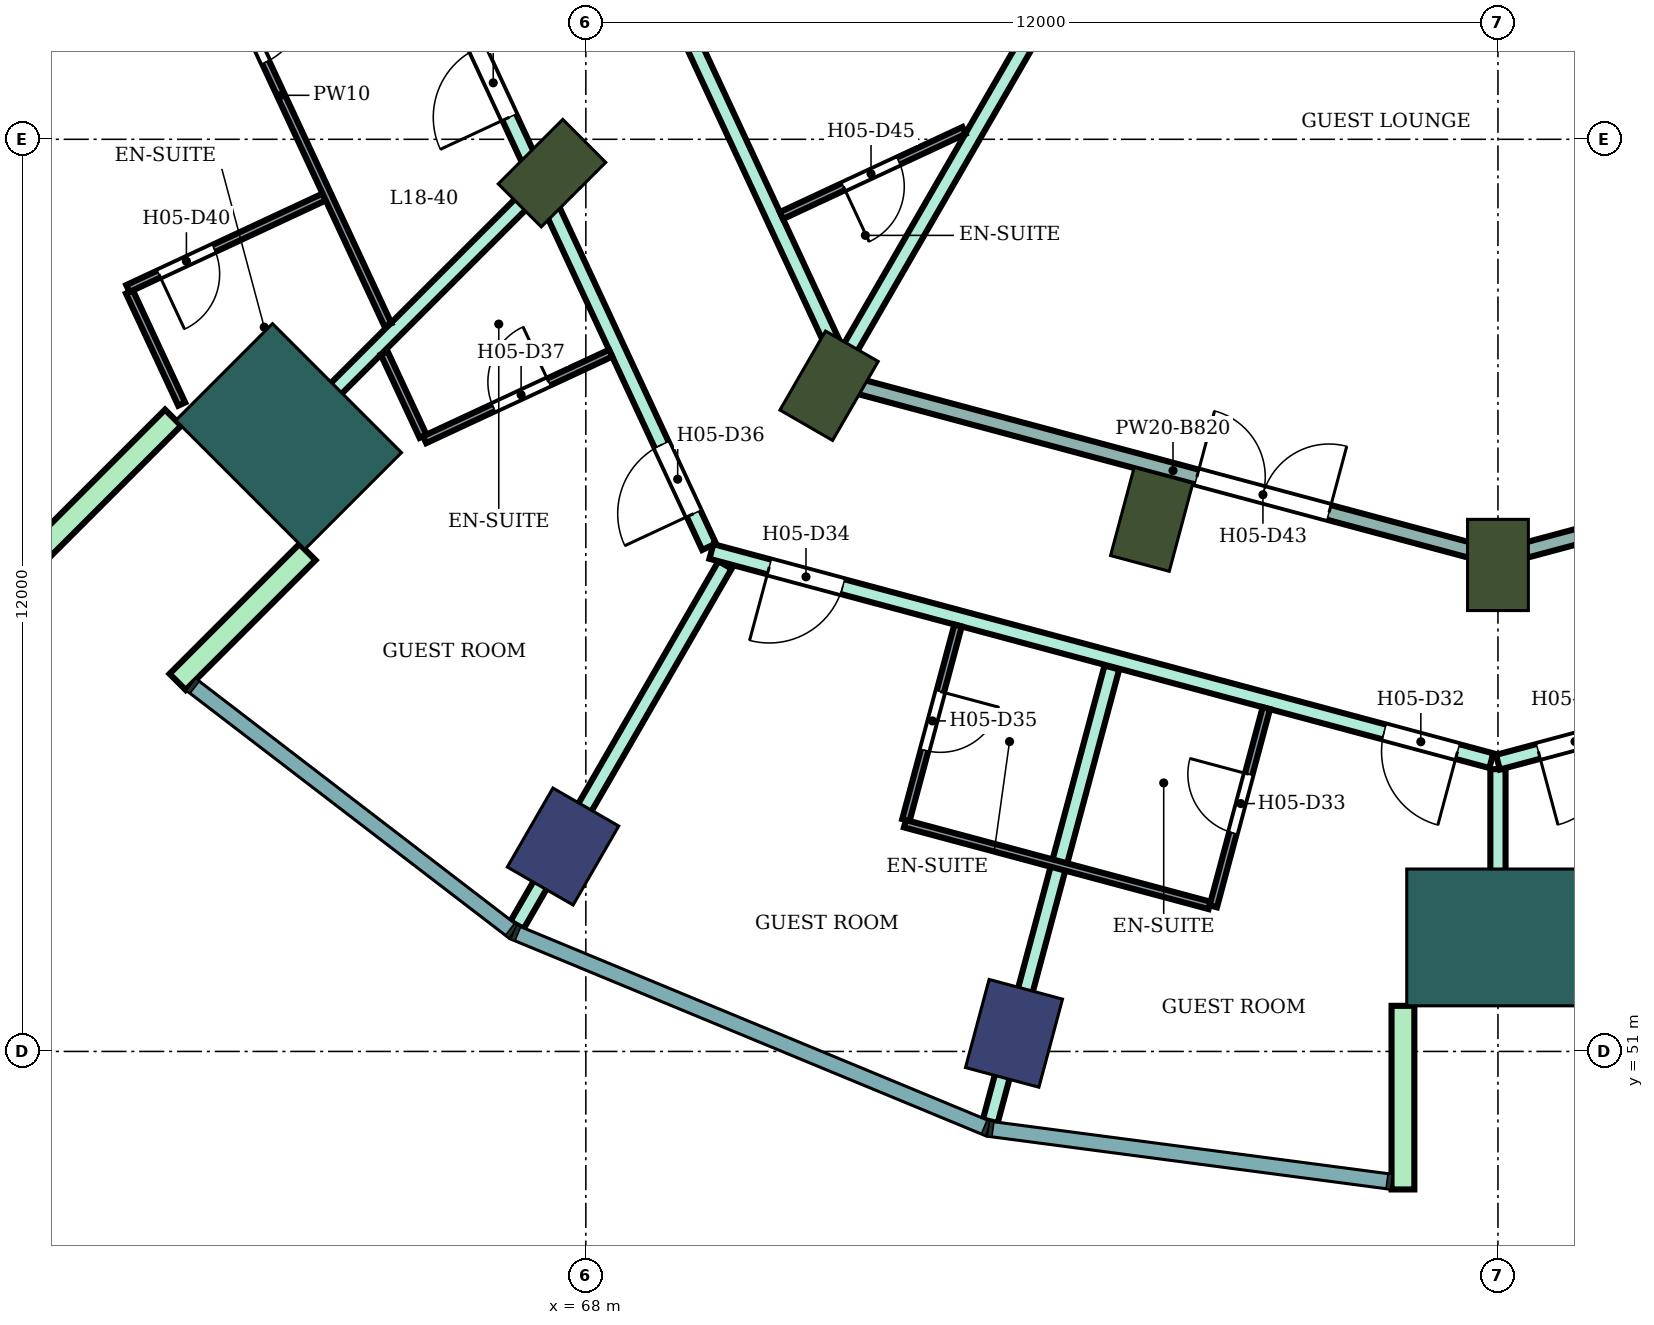
"""IFC4 building model, lengths in metres.
Left out: names, types, materials, properties, quantities, classifications, styles, units other than length and angle.
Written with IfcOpenShell. Run it as: python <this file> out.ifc"""

import sys

from ifc_helpers import new_model, si_unit, direction, frame, frame_2d, origin, origin_2d, place, context, subcontext, project, spatial, rectangle, extrude, element, fill, save


model = new_model("IFC4")
c1 = context("Model", 3, precision=1e-05, world=origin(), true_north=direction((0.0, 1.0)))
c2 = subcontext(c1, "Body", "Model", "MODEL_VIEW")
j1 = project(units=[si_unit("LENGTHUNIT", "METRE"), si_unit("PLANEANGLEUNIT", "RADIAN")], contexts=[c1])
p1 = place(None, origin())
s1 = spatial("IfcSite", under=j1, at=p1, CompositionType="ELEMENT")
p2 = place(p1, origin())
s2 = spatial("IfcBuilding", under=s1, at=p2, CompositionType="ELEMENT")
p3 = place(p2, frame((0.0, 0.0, 82.4)))
s3 = spatial("IfcBuildingStorey", under=s2, at=p3, CompositionType="ELEMENT", Elevation=82.4)
for number, where, z_axis, x_axis in (
    (1, (67.7, 53.696, 0.0), (0.0, 0.0, 1.0), (-0.5, -0.866, 0.0)),
    (2, (73.633, 51.238, 0.0), (0.0, 0.0, 1.0), (-0.259, -0.966, 0.0)),
):
    element("IfcColumn", number, at=place(p3, frame(where, z_axis=z_axis, x_axis=x_axis)), inside=s3, PredefinedType="COLUMN", context=c2, shape_type="SweptSolid", body=[
        extrude(rectangle(XDim=1.2, YDim=1.0, at=origin_2d()), origin(), (0.0, 0.0, 1.0), 3.8),
    ])
for number, where, z_axis, x_axis in (
    (3, (67.555, 62.555, 0.0), (0.0, 0.0, 1.0), (-0.707, -0.707, 0.0)),
    (4, (71.2, 59.758, 0.0), (0.0, 0.0, 1.0), (-0.5, -0.866, 0.0)),
    (5, (75.445, 58.0, 0.0), (0.0, 0.0, 1.0), (-0.259, -0.966, 0.0)),
    (6, (80.0, 57.4, 0.0), (0.0, 0.0, 1.0), (0.0, -1.0, 0.0)),
):
    element("IfcColumn", number, at=place(p3, frame(where, z_axis=z_axis, x_axis=x_axis)), inside=s3, PredefinedType="COLUMN", context=c2, shape_type="SweptSolid", body=[
        extrude(rectangle(XDim=1.2, YDim=0.8, at=origin_2d()), origin(), (0.0, 0.0, 1.0), 3.8),
    ])
for number, where, z_axis, x_axis in (
    (7, (64.09, 59.09, 0.0), (0.0, 0.0, 1.0), (-0.707, -0.707, 0.0)),
    (8, (80.0, 52.5, 0.0), (0.0, 0.0, 1.0), (0.0, -1.0, 0.0)),
):
    element("IfcColumn", number, at=place(p3, frame(where, z_axis=z_axis, x_axis=x_axis)), inside=s3, PredefinedType="COLUMN", context=c2, shape_type="SweptSolid", body=[
        extrude(rectangle(XDim=1.8, YDim=2.4, at=origin_2d()), origin(), (0.0, 0.0, 1.0), 3.8),
    ])
for number, where, z_axis, x_axis in (
    (9, (62.57, 59.338, 0.0), (0.0, 0.0, 1.0), (-0.707, -0.707, 0.0)),
    (10, (64.338, 57.57, 0.0), (0.0, 0.0, 1.0), (-0.707, -0.707, 0.0)),
    (11, (78.75, 51.6, 0.0), (0.0, 0.0, 1.0), (0.0, -1.0, 0.0)),
):
    element("IfcWall", number, at=place(p3, frame(where, z_axis=z_axis, x_axis=x_axis)), inside=s3, PredefinedType="NOTDEFINED", context=c2, shape_type="SweptSolid", body=[
        extrude(rectangle(XDim=2.416, YDim=0.3, at=frame_2d((1.208, 0.0))), origin(), (0.0, 0.0, 1.0), 3.8),
    ])
p4 = place(p3, frame((63.593, 58.599, 0.0), z_axis=(0.0, 0.0, 1.0), x_axis=(0.707292874152, 0.706920639233, 0.0)))
e12 = element("IfcWall", 12, at=p4, inside=s3, PredefinedType="PARTITIONING", context=c2, shape_type="SweptSolid", body=[
    extrude(rectangle(XDim=5.247, YDim=0.2, at=frame_2d((2.624, 0.0))), origin(), (0.0, 0.0, 1.0), 3.35),
])
p5 = place(p3, frame((66.15, 65.1, 0.0), z_axis=(0.0, 0.0, 1.0), x_axis=(0.421874842351, -0.906654078131, 0.0)))
e13 = element("IfcWall", 13, at=p5, inside=s3, PredefinedType="PARTITIONING", context=c2, shape_type="SweptSolid", body=[
    extrude(rectangle(XDim=8.228, YDim=0.2, at=frame_2d((4.114, 0.0))), origin(), (0.0, 0.0, 1.0), 3.35),
])
p6 = place(p5, frame((6.748, 0.0, 0.0)))
e14 = element("IfcOpeningElement", 14, at=p6, cuts=e13, PredefinedType="OPENING", context=c2, shape_type="SweptSolid", body=[
    extrude(rectangle(XDim=1.0, YDim=2.1, at=frame_2d((0.5, 1.05))), frame((0.0, 0.11, 0.0), z_axis=(0.0, -1.0, 0.0), x_axis=(1.0, 0.0, 0.0)), (0.0, 0.0, 1.0), 0.22),
])
p7 = place(p5, frame((0.997, 0.0, 0.0)))
e15 = element("IfcOpeningElement", 15, at=p7, cuts=e13, PredefinedType="OPENING", context=c2, shape_type="SweptSolid", body=[
    extrude(rectangle(XDim=1.0, YDim=2.1, at=frame_2d((0.5, 1.05))), frame((0.0, 0.11, 0.0), z_axis=(0.0, -1.0, 0.0), x_axis=(1.0, 0.0, 0.0)), (0.0, 0.0, 1.0), 0.22),
])
p8 = place(p3, frame((67.094, 52.663, 0.0), z_axis=(0.0, 0.0, 1.0), x_axis=(0.50023225055, 0.865891272337, 0.0)))
e16 = element("IfcWall", 16, at=p8, inside=s3, PredefinedType="PARTITIONING", context=c2, shape_type="SweptSolid", body=[
    extrude(rectangle(XDim=5.472, YDim=0.2, at=frame_2d((2.736, 0.0))), origin(), (0.0, 0.0, 1.0), 3.35),
])
p9 = place(p3, frame((68.321, 66.6, 0.0), z_axis=(0.0, 0.0, 1.0), x_axis=(0.421914092414, -0.906635813666, 0.0)))
e17 = element("IfcWall", 17, at=p9, inside=s3, PredefinedType="PARTITIONING", context=c2, shape_type="SweptSolid", body=[
    extrude(rectangle(XDim=7.459, YDim=0.2, at=frame_2d((3.73, 0.0))), origin(), (0.0, 0.0, 1.0), 3.35),
])
p10 = place(p9, frame((0.7, 0.0, 0.0)))
e18 = element("IfcOpeningElement", 18, at=p10, cuts=e17, PredefinedType="OPENING", context=c2, shape_type="SweptSolid", body=[
    extrude(rectangle(XDim=1.0, YDim=2.1, at=frame_2d((0.5, 1.05))), frame((0.0, 0.11, 0.0), z_axis=(0.0, -1.0, 0.0), x_axis=(1.0, 0.0, 0.0)), (0.0, 0.0, 1.0), 0.22),
])
p11 = place(p3, frame((69.652, 57.578, 0.0), z_axis=(0.0, 0.0, 1.0), x_axis=(0.965857425723, -0.259074184695, 0.0)))
e19 = element("IfcWall", 19, at=p11, inside=s3, PredefinedType="PARTITIONING", context=c2, shape_type="SweptSolid", body=[
    extrude(rectangle(XDim=10.623, YDim=0.2, at=frame_2d((5.312, 0.0))), origin(), (0.0, 0.0, 1.0), 3.35),
])
p12 = place(p11, frame((9.163, 0.0, 0.0)))
e20 = element("IfcOpeningElement", 20, at=p12, cuts=e19, PredefinedType="OPENING", context=c2, shape_type="SweptSolid", body=[
    extrude(rectangle(XDim=1.0, YDim=2.1, at=frame_2d((0.5, 1.05))), frame((0.0, 0.11, 0.0), z_axis=(0.0, -1.0, 0.0), x_axis=(1.0, 0.0, 0.0)), (0.0, 0.0, 1.0), 0.22),
])
p13 = place(p11, frame((0.788, 0.0, 0.0)))
e21 = element("IfcOpeningElement", 21, at=p13, cuts=e19, PredefinedType="OPENING", context=c2, shape_type="SweptSolid", body=[
    extrude(rectangle(XDim=1.0, YDim=2.1, at=frame_2d((0.5, 1.05))), frame((0.0, 0.11, 0.0), z_axis=(0.0, -1.0, 0.0), x_axis=(1.0, 0.0, 0.0)), (0.0, 0.0, 1.0), 0.22),
])
p14 = place(p3, frame((71.459, 60.218, 0.0), z_axis=(0.0, 0.0, 1.0), x_axis=(0.500232027118, 0.865891401416, 0.0)))
e22 = element("IfcWall", 22, at=p14, inside=s3, PredefinedType="PARTITIONING", context=c2, shape_type="SweptSolid", body=[
    extrude(rectangle(XDim=9.372, YDim=0.2, at=frame_2d((4.686, 0.0))), origin(), (0.0, 0.0, 1.0), 3.35),
])
p15 = place(p3, frame((71.498, 59.774, 0.0), z_axis=(0.0, 0.0, 1.0), x_axis=(0.965911938046, -0.258870871168, 0.0)))
e23 = element("IfcWall", 23, at=p15, inside=s3, PredefinedType="PARTITIONING", context=c2, shape_type="SweptSolid", body=[
    extrude(rectangle(XDim=8.752, YDim=0.2, at=frame_2d((4.376, 0.0))), origin(), (0.0, 0.0, 1.0), 2.98),
])
p16 = place(p15, frame((4.701, 0.0, 0.0)))
e24 = element("IfcOpeningElement", 24, at=p16, cuts=e23, PredefinedType="OPENING", context=c2, shape_type="SweptSolid", body=[
    extrude(rectangle(XDim=1.8, YDim=2.1, at=frame_2d((0.9, 1.05))), frame((0.0, 0.11, 0.0), z_axis=(0.0, -1.0, 0.0), x_axis=(1.0, 0.0, 0.0)), (0.0, 0.0, 1.0), 0.22),
])
p17 = place(p3, frame((73.321, 50.081, 0.0), z_axis=(0.0, 0.0, 1.0), x_axis=(0.258886797764, 0.965907669471, 0.0)))
e25 = element("IfcWall", 25, at=p17, inside=s3, PredefinedType="PARTITIONING", context=c2, shape_type="SweptSolid", body=[
    extrude(rectangle(XDim=6.181, YDim=0.2, at=frame_2d((3.09, 0.0))), origin(), (0.0, 0.0, 1.0), 3.35),
])
p18 = place(p3, frame((80.0, 51.8, 0.0), z_axis=(0.0, 0.0, 1.0), x_axis=(0.0, 1.0, 0.0)))
e26 = element("IfcWall", 26, at=p18, inside=s3, PredefinedType="PARTITIONING", context=c2, shape_type="SweptSolid", body=[
    extrude(rectangle(XDim=2.914, YDim=0.2, at=frame_2d((1.457, 0.0))), origin(), (0.0, 0.0, 1.0), 3.35),
])
p19 = place(p3, frame((80.0, 54.805, 0.0), z_axis=(0.0, 0.0, 1.0), x_axis=(0.965962177934, 0.258683340788, 0.0)))
e27 = element("IfcWall", 27, at=p19, inside=s3, PredefinedType="PARTITIONING", context=c2, shape_type="SweptSolid", body=[
    extrude(rectangle(XDim=10.643, YDim=0.2, at=frame_2d((5.322, 0.0))), origin(), (0.0, 0.0, 1.0), 3.35),
])
p20 = place(p19, frame((8.925, 0.0, 0.0)))
e28 = element("IfcOpeningElement", 28, at=p20, cuts=e27, PredefinedType="OPENING", context=c2, shape_type="SweptSolid", body=[
    extrude(rectangle(XDim=1.0, YDim=2.1, at=frame_2d((0.5, 1.05))), frame((0.0, 0.11, 0.0), z_axis=(0.0, -1.0, 0.0), x_axis=(1.0, 0.0, 0.0)), (0.0, 0.0, 1.0), 0.22),
])
p21 = place(p19, frame((0.55, 0.0, 0.0)))
e29 = element("IfcOpeningElement", 29, at=p21, cuts=e27, PredefinedType="OPENING", context=c2, shape_type="SweptSolid", body=[
    extrude(rectangle(XDim=1.0, YDim=2.1, at=frame_2d((0.5, 1.05))), frame((0.0, 0.11, 0.0), z_axis=(0.0, -1.0, 0.0), x_axis=(1.0, 0.0, 0.0)), (0.0, 0.0, 1.0), 0.22),
])
p22 = place(p3, frame((80.0, 57.496, 0.0), z_axis=(0.0, 0.0, 1.0), x_axis=(0.96592471314, 0.258823199396, 0.0)))
e30 = element("IfcWall", 30, at=p22, inside=s3, PredefinedType="PARTITIONING", context=c2, shape_type="SweptSolid", body=[
    extrude(rectangle(XDim=8.732, YDim=0.2, at=frame_2d((4.366, 0.0))), origin(), (0.0, 0.0, 1.0), 2.98),
])
p23 = place(p3, frame((61.996, 60.992, 0.0), z_axis=(0.0, 0.0, 1.0), x_axis=(0.422318684634, -0.906447421867, 0.0)))
e31 = element("IfcWall", 31, at=p23, inside=s3, PredefinedType="PARTITIONING", context=c2, shape_type="SweptSolid", body=[
    extrude(rectangle(XDim=1.627, YDim=0.1, at=frame_2d((0.814, 0.0))), origin(), (0.0, 0.0, 1.0), 3.35),
])
p24 = place(p3, frame((61.975, 61.037, 0.0), z_axis=(0.0, 0.0, 1.0), x_axis=(0.906360368959, 0.422505481125, 0.0)))
e32 = element("IfcWall", 32, at=p24, inside=s3, PredefinedType="PARTITIONING", context=c2, shape_type="SweptSolid", body=[
    extrude(rectangle(XDim=2.849, YDim=0.1, at=frame_2d((1.425, 0.0))), origin(), (0.0, 0.0, 1.0), 3.35),
])
p25 = place(p24, frame((0.45, 0.0, 0.0)))
e33 = element("IfcOpeningElement", 33, at=p25, cuts=e32, PredefinedType="OPENING", context=c2, shape_type="SweptSolid", body=[
    extrude(rectangle(XDim=0.8, YDim=2.1, at=frame_2d((0.4, 1.05))), frame((0.0, 0.06, 0.0), z_axis=(0.0, -1.0, 0.0), x_axis=(1.0, 0.0, 0.0)), (0.0, 0.0, 1.0), 0.12),
])
p26 = place(p3, frame((62.582, 66.6, 0.0), z_axis=(0.0, 0.0, 1.0), x_axis=(0.422283870085, -0.906463641337, 0.0)))
e34 = element("IfcWall", 34, at=p26, inside=s3, PredefinedType="PARTITIONING", context=c2, shape_type="SweptSolid", body=[
    extrude(rectangle(XDim=6.666, YDim=0.1, at=frame_2d((3.333, 0.0))), origin(), (0.0, 0.0, 1.0), 3.35),
])
p27 = place(p26, frame((1.953, 0.0, 0.0)))
e35 = element("IfcOpeningElement", 35, at=p27, cuts=e34, PredefinedType="OPENING", context=c2, shape_type="SweptSolid", body=[
    extrude(rectangle(XDim=0.9, YDim=2.1, at=frame_2d((0.45, 1.05))), frame((0.0, 0.06, 0.0), z_axis=(0.0, -1.0, 0.0), x_axis=(1.0, 0.0, 0.0)), (0.0, 0.0, 1.0), 0.12),
])
p28 = place(p3, frame((65.348, 60.188, 0.0), z_axis=(0.0, 0.0, 1.0), x_axis=(0.422387529151, -0.906415343657, 0.0)))
e36 = element("IfcWall", 36, at=p28, inside=s3, PredefinedType="PARTITIONING", context=c2, shape_type="SweptSolid", body=[
    extrude(rectangle(XDim=1.208, YDim=0.1, at=frame_2d((0.604, 0.0))), origin(), (0.0, 0.0, 1.0), 3.35),
])
p29 = place(p3, frame((65.879, 59.048, 0.0), z_axis=(0.0, 0.0, 1.0), x_axis=(0.906746039995, 0.421677150144, 0.0)))
e37 = element("IfcWall", 37, at=p29, inside=s3, PredefinedType="PARTITIONING", context=c2, shape_type="SweptSolid", body=[
    extrude(rectangle(XDim=2.7, YDim=0.1, at=frame_2d((1.35, 0.0))), origin(), (0.0, 0.0, 1.0), 3.35),
])
p30 = place(p29, frame((1.0, 0.0, 0.0)))
e38 = element("IfcOpeningElement", 38, at=p30, cuts=e37, PredefinedType="OPENING", context=c2, shape_type="SweptSolid", body=[
    extrude(rectangle(XDim=0.8, YDim=2.1, at=frame_2d((0.4, 1.05))), frame((0.0, 0.06, 0.0), z_axis=(0.0, -1.0, 0.0), x_axis=(1.0, 0.0, 0.0)), (0.0, 0.0, 1.0), 0.12),
])
p31 = place(p3, frame((70.574, 61.997, 0.0), z_axis=(0.0, 0.0, 1.0), x_axis=(0.906503026865, 0.422199315826, 0.0)))
e39 = element("IfcWall", 39, at=p31, inside=s3, PredefinedType="PARTITIONING", context=c2, shape_type="SweptSolid", body=[
    extrude(rectangle(XDim=2.65, YDim=0.1, at=frame_2d((1.325, 0.0))), origin(), (0.0, 0.0, 1.0), 3.35),
])
p32 = place(p31, frame((0.9, 0.0, 0.0)))
e40 = element("IfcOpeningElement", 40, at=p32, cuts=e39, PredefinedType="OPENING", context=c2, shape_type="SweptSolid", body=[
    extrude(rectangle(XDim=0.8, YDim=2.1, at=frame_2d((0.4, 1.05))), frame((0.0, 0.06, 0.0), z_axis=(0.0, -1.0, 0.0), x_axis=(1.0, 0.0, 0.0)), (0.0, 0.0, 1.0), 0.12),
])
p33 = place(p3, frame((72.211, 54.044, 0.0), z_axis=(0.0, 0.0, 1.0), x_axis=(0.258866552082, 0.96591309558, 0.0)))
e41 = element("IfcWall", 41, at=p33, inside=s3, PredefinedType="PARTITIONING", context=c2, shape_type="SweptSolid", body=[
    extrude(rectangle(XDim=2.65, YDim=0.1, at=frame_2d((1.325, 0.0))), origin(), (0.0, 0.0, 1.0), 3.35),
])
p34 = place(p33, frame((0.95, 0.0, 0.0)))
e42 = element("IfcOpeningElement", 42, at=p34, cuts=e41, PredefinedType="OPENING", context=c2, shape_type="SweptSolid", body=[
    extrude(rectangle(XDim=0.8, YDim=2.1, at=frame_2d((0.4, 1.05))), frame((0.0, 0.06, 0.0), z_axis=(0.0, -1.0, 0.0), x_axis=(1.0, 0.0, 0.0)), (0.0, 0.0, 1.0), 0.12),
])
p35 = place(p3, frame((72.198, 53.996, 0.0), z_axis=(0.0, 0.0, 1.0), x_axis=(0.965855045962, -0.259083056549, 0.0)))
e43 = element("IfcWall", 43, at=p35, inside=s3, PredefinedType="PARTITIONING", context=c2, shape_type="SweptSolid", body=[
    extrude(rectangle(XDim=4.15, YDim=0.1, at=frame_2d((2.075, 0.0))), origin(), (0.0, 0.0, 1.0), 3.35),
])
p36 = place(p3, frame((76.255, 52.909, 0.0), z_axis=(0.0, 0.0, 1.0), x_axis=(0.25867580527, 0.965964195904, 0.0)))
e44 = element("IfcWall", 44, at=p36, inside=s3, PredefinedType="PARTITIONING", context=c2, shape_type="SweptSolid", body=[
    extrude(rectangle(XDim=2.699, YDim=0.1, at=frame_2d((1.35, 0.0))), origin(), (0.0, 0.0, 1.0), 3.35),
])
p37 = place(p36, frame((1.0, 0.0, 0.0)))
e45 = element("IfcOpeningElement", 45, at=p37, cuts=e44, PredefinedType="OPENING", context=c2, shape_type="SweptSolid", body=[
    extrude(rectangle(XDim=0.8, YDim=2.1, at=frame_2d((0.4, 1.05))), frame((0.0, 0.06, 0.0), z_axis=(0.0, -1.0, 0.0), x_axis=(1.0, 0.0, 0.0)), (0.0, 0.0, 1.0), 0.12),
])
p38 = place(p21, frame((1.0, 0.0, 0.0), z_axis=(0.0, 0.0, 1.0), x_axis=(-1.0, 0.0, 0.0)))
e46 = element("IfcDoor", 46, at=p38, inside=s3, OperationType="SINGLE_SWING_RIGHT", PredefinedType="DOOR", context=c2, shape_type="SweptSolid", body=[
    extrude(rectangle(XDim=1.0, YDim=2.1, at=frame_2d((0.5, 1.05))), frame((0.0, 0.025, 0.0), z_axis=(0.0, -1.0, 0.0), x_axis=(1.0, 0.0, 0.0)), (0.0, 0.0, 1.0), 0.05),
])
fill(e29, e46)
p39 = place(p12, frame((1.0, 0.0, 0.0), z_axis=(0.0, 0.0, 1.0), x_axis=(-1.0, 0.0, 0.0)))
e47 = element("IfcDoor", 47, at=p39, inside=s3, OperationType="SINGLE_SWING_LEFT", PredefinedType="DOOR", context=c2, shape_type="SweptSolid", body=[
    extrude(rectangle(XDim=1.0, YDim=2.1, at=frame_2d((0.5, 1.05))), frame((0.0, 0.025, 0.0), z_axis=(0.0, -1.0, 0.0), x_axis=(1.0, 0.0, 0.0)), (0.0, 0.0, 1.0), 0.05),
])
fill(e20, e47)
p40 = place(p37, origin())
e48 = element("IfcDoor", 48, at=p40, inside=s3, OperationType="SINGLE_SWING_RIGHT", PredefinedType="DOOR", context=c2, shape_type="SweptSolid", body=[
    extrude(rectangle(XDim=0.8, YDim=2.1, at=frame_2d((0.4, 1.05))), frame((0.0, 0.025, 0.0), z_axis=(0.0, -1.0, 0.0), x_axis=(1.0, 0.0, 0.0)), (0.0, 0.0, 1.0), 0.05),
])
fill(e45, e48)
p41 = place(p13, frame((1.0, 0.0, 0.0), z_axis=(0.0, 0.0, 1.0), x_axis=(-1.0, 0.0, 0.0)))
e49 = element("IfcDoor", 49, at=p41, inside=s3, OperationType="SINGLE_SWING_RIGHT", PredefinedType="DOOR", context=c2, shape_type="SweptSolid", body=[
    extrude(rectangle(XDim=1.0, YDim=2.1, at=frame_2d((0.5, 1.05))), frame((0.0, 0.025, 0.0), z_axis=(0.0, -1.0, 0.0), x_axis=(1.0, 0.0, 0.0)), (0.0, 0.0, 1.0), 0.05),
])
fill(e21, e49)
p42 = place(p34, frame((0.8, 0.0, 0.0), z_axis=(0.0, 0.0, 1.0), x_axis=(-1.0, 0.0, 0.0)))
e50 = element("IfcDoor", 50, at=p42, inside=s3, OperationType="SINGLE_SWING_LEFT", PredefinedType="DOOR", context=c2, shape_type="SweptSolid", body=[
    extrude(rectangle(XDim=0.8, YDim=2.1, at=frame_2d((0.4, 1.05))), frame((0.0, 0.025, 0.0), z_axis=(0.0, -1.0, 0.0), x_axis=(1.0, 0.0, 0.0)), (0.0, 0.0, 1.0), 0.05),
])
fill(e42, e50)
p43 = place(p6, frame((1.0, 0.0, 0.0), z_axis=(0.0, 0.0, 1.0), x_axis=(-1.0, 0.0, 0.0)))
e51 = element("IfcDoor", 51, at=p43, inside=s3, OperationType="SINGLE_SWING_LEFT", PredefinedType="DOOR", context=c2, shape_type="SweptSolid", body=[
    extrude(rectangle(XDim=1.0, YDim=2.1, at=frame_2d((0.5, 1.05))), frame((0.0, 0.025, 0.0), z_axis=(0.0, -1.0, 0.0), x_axis=(1.0, 0.0, 0.0)), (0.0, 0.0, 1.0), 0.05),
])
fill(e14, e51)
p44 = place(p30, origin())
e52 = element("IfcDoor", 52, at=p44, inside=s3, OperationType="SINGLE_SWING_RIGHT", PredefinedType="DOOR", context=c2, shape_type="SweptSolid", body=[
    extrude(rectangle(XDim=0.8, YDim=2.1, at=frame_2d((0.4, 1.05))), frame((0.0, 0.025, 0.0), z_axis=(0.0, -1.0, 0.0), x_axis=(1.0, 0.0, 0.0)), (0.0, 0.0, 1.0), 0.05),
])
fill(e38, e52)
p45 = place(p7, frame((1.0, 0.0, 0.0), z_axis=(0.0, 0.0, 1.0), x_axis=(-1.0, 0.0, 0.0)))
e53 = element("IfcDoor", 53, at=p45, inside=s3, OperationType="SINGLE_SWING_LEFT", PredefinedType="DOOR", context=c2, shape_type="SweptSolid", body=[
    extrude(rectangle(XDim=1.0, YDim=2.1, at=frame_2d((0.5, 1.05))), frame((0.0, 0.025, 0.0), z_axis=(0.0, -1.0, 0.0), x_axis=(1.0, 0.0, 0.0)), (0.0, 0.0, 1.0), 0.05),
])
fill(e15, e53)
p46 = place(p27, origin())
e54 = element("IfcDoor", 54, at=p46, inside=s3, OperationType="SINGLE_SWING_LEFT", PredefinedType="DOOR", context=c2, shape_type="SweptSolid", body=[
    extrude(rectangle(XDim=0.9, YDim=2.1, at=frame_2d((0.45, 1.05))), frame((0.0, 0.025, 0.0), z_axis=(0.0, -1.0, 0.0), x_axis=(1.0, 0.0, 0.0)), (0.0, 0.0, 1.0), 0.05),
])
fill(e35, e54)
p47 = place(p25, frame((0.8, 0.0, 0.0), z_axis=(0.0, 0.0, 1.0), x_axis=(-1.0, 0.0, 0.0)))
e55 = element("IfcDoor", 55, at=p47, inside=s3, OperationType="SINGLE_SWING_RIGHT", PredefinedType="DOOR", context=c2, shape_type="SweptSolid", body=[
    extrude(rectangle(XDim=0.8, YDim=2.1, at=frame_2d((0.4, 1.05))), frame((0.0, 0.025, 0.0), z_axis=(0.0, -1.0, 0.0), x_axis=(1.0, 0.0, 0.0)), (0.0, 0.0, 1.0), 0.05),
])
fill(e33, e55)
p48 = place(p16, origin())
e56 = element("IfcDoor", 56, at=p48, inside=s3, OperationType="DOUBLE_DOOR_SINGLE_SWING", PredefinedType="DOOR", context=c2, shape_type="SweptSolid", body=[
    extrude(rectangle(XDim=1.8, YDim=2.1, at=frame_2d((0.9, 1.05))), frame((0.0, 0.025, 0.0), z_axis=(0.0, -1.0, 0.0), x_axis=(1.0, 0.0, 0.0)), (0.0, 0.0, 1.0), 0.05),
])
fill(e24, e56)
p49 = place(p32, frame((0.8, 0.0, 0.0), z_axis=(0.0, 0.0, 1.0), x_axis=(-1.0, 0.0, 0.0)))
e57 = element("IfcDoor", 57, at=p49, inside=s3, OperationType="SINGLE_SWING_RIGHT", PredefinedType="DOOR", context=c2, shape_type="SweptSolid", body=[
    extrude(rectangle(XDim=0.8, YDim=2.1, at=frame_2d((0.4, 1.05))), frame((0.0, 0.025, 0.0), z_axis=(0.0, -1.0, 0.0), x_axis=(1.0, 0.0, 0.0)), (0.0, 0.0, 1.0), 0.05),
])
fill(e40, e57)
save(model, sys.argv[1])
